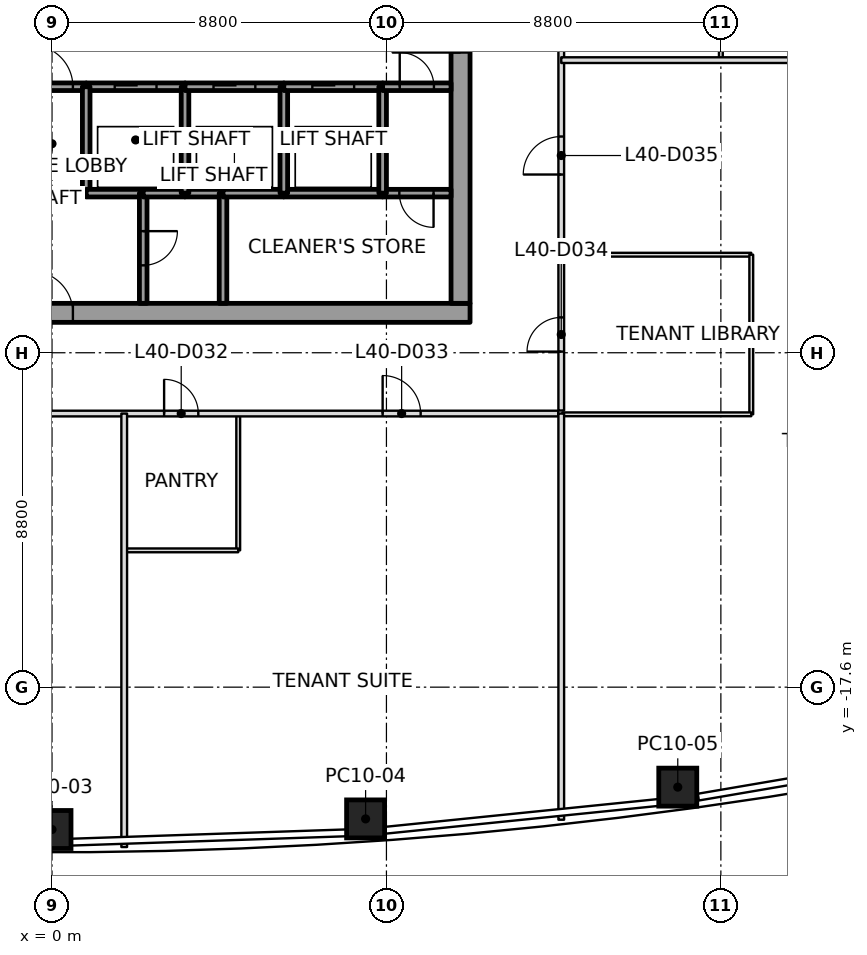
"""IFC4 building model, lengths in metres.
Left out: names, types, materials, properties, quantities, classifications, styles, units other than length and angle.
Written with IfcOpenShell. Run it as: python <this file> out.ifc"""

import sys

from ifc_helpers import new_model, si_unit, direction, frame, frame_2d, origin, origin_2d, place, context, subcontext, project, spatial, rectangle, extrude, element, fill, save


model = new_model("IFC4")
c1 = context("Model", 3, precision=1e-05, world=origin(), true_north=direction((0.0, 1.0)))
c2 = subcontext(c1, "Body", "Model", "MODEL_VIEW")
j1 = project(units=[si_unit("LENGTHUNIT", "METRE"), si_unit("PLANEANGLEUNIT", "RADIAN")], contexts=[c1])
p1 = place(None, origin())
s1 = spatial("IfcSite", under=j1, at=p1, CompositionType="ELEMENT")
p2 = place(p1, origin())
s2 = spatial("IfcBuilding", under=s1, at=p2, CompositionType="ELEMENT")
p3 = place(p2, frame((0.0, 0.0, 181.8)))
s3 = spatial("IfcBuildingStorey", under=s2, at=p3, CompositionType="ELEMENT", Elevation=181.8)
p4 = place(p3, frame((0.0, -21.346, 0.0), z_axis=(0.0, 0.01141283087, 0.999934871525), x_axis=(1.0, 0.0, 0.0)))
e1 = element("IfcColumn", 1, at=p4, inside=s3, PredefinedType="COLUMN", context=c2, shape_type="SweptSolid", body=[
    extrude(rectangle(XDim=1.0, YDim=1.0, at=origin_2d()), origin(), (0.0, 0.0, 1.0), 4.0),
])
p5 = place(p3, frame((8.252, -21.067, 0.0), z_axis=(-0.008788174922, 0.01116830563, 0.999899013366), x_axis=(0.997677690946, 0.0676388512, 0.008013163924)))
e2 = element("IfcColumn", 2, at=p5, inside=s3, PredefinedType="COLUMN", context=c2, shape_type="SweptSolid", body=[
    extrude(rectangle(XDim=1.0, YDim=1.0, at=origin_2d()), origin(), (0.0, 0.0, 1.0), 4.0),
])
p6 = place(p3, frame((16.466, -20.231, 0.0), z_axis=(-0.017574453011, 0.010434831475, 0.999791104628), x_axis=(0.990722511159, 0.134954425998, 0.016006523216)))
e3 = element("IfcColumn", 3, at=p6, inside=s3, PredefinedType="COLUMN", context=c2, shape_type="SweptSolid", body=[
    extrude(rectangle(XDim=1.0, YDim=1.0, at=origin_2d()), origin(), (0.0, 0.0, 1.0), 4.001),
])
p7 = place(p3, frame((-11.0, -7.75, 0.0), z_axis=(0.0, 0.0, 1.0), x_axis=(1.0, 0.0, 0.0)))
e4 = element("IfcWall", 4, at=p7, inside=s3, PredefinedType="SHEAR", context=c2, shape_type="SweptSolid", body=[
    extrude(rectangle(XDim=22.0, YDim=0.5, at=frame_2d((11.0, 0.0))), origin(), (0.0, 0.0, 1.0), 4.0),
])
p8 = place(p7, frame((10.45, 0.0, 0.0)))
e5 = element("IfcOpeningElement", 5, at=p8, cuts=e4, PredefinedType="OPENING", context=c2, shape_type="SweptSolid", body=[
    extrude(rectangle(XDim=1.1, YDim=2.1, at=frame_2d((0.55, 1.05))), frame((0.0, 0.25, 0.0), z_axis=(0.0, -1.0, 0.0), x_axis=(1.0, 0.0, 0.0)), (0.0, 0.0, 1.0), 0.5),
])
p9 = place(p3, frame((10.75, -7.5, 0.0), z_axis=(0.0, 0.0, 1.0), x_axis=(0.0, 1.0, 0.0)))
e6 = element("IfcWall", 6, at=p9, inside=s3, PredefinedType="SHEAR", context=c2, shape_type="SweptSolid", body=[
    extrude(rectangle(XDim=15.0, YDim=0.5, at=frame_2d((7.5, 0.0))), origin(), (0.0, 0.0, 1.0), 4.0),
])
p10 = place(p9, frame((6.6, 0.0, 0.0)))
e7 = element("IfcOpeningElement", 7, at=p10, cuts=e6, PredefinedType="OPENING", context=c2, shape_type="SweptSolid", body=[
    extrude(rectangle(XDim=1.8, YDim=2.1, at=frame_2d((0.9, 1.05))), frame((0.0, 0.25, 0.0), z_axis=(0.0, -1.0, 0.0), x_axis=(1.0, 0.0, 0.0)), (0.0, 0.0, 1.0), 0.5),
])
p11 = place(p3, frame((-0.9, -1.8, 0.0), z_axis=(0.0, 0.0, 1.0), x_axis=(1.0, 0.0, 0.0)))
e8 = element("IfcWall", 8, at=p11, inside=s3, PredefinedType="SOLIDWALL", context=c2, shape_type="SweptSolid", body=[
    extrude(rectangle(XDim=1.8, YDim=0.2, at=frame_2d((0.9, 0.0))), origin(), (0.0, 0.0, 1.0), 3.85),
])
p12 = place(p11, frame((0.35, 0.0, 0.0)))
e9 = element("IfcOpeningElement", 9, at=p12, cuts=e8, PredefinedType="OPENING", context=c2, shape_type="SweptSolid", body=[
    extrude(rectangle(XDim=1.1, YDim=2.1, at=frame_2d((0.55, 1.05))), frame((0.0, 0.1, 0.0), z_axis=(0.0, -1.0, 0.0), x_axis=(1.0, 0.0, 0.0)), (0.0, 0.0, 1.0), 0.2),
])
p13 = place(p3, frame((0.9, -1.8, 0.0), z_axis=(0.0, 0.0, 1.0), x_axis=(1.0, 0.0, 0.0)))
e10 = element("IfcWall", 10, at=p13, inside=s3, PredefinedType="SOLIDWALL", context=c2, shape_type="SweptSolid", body=[
    extrude(rectangle(XDim=2.6, YDim=0.2, at=frame_2d((1.3, 0.0))), origin(), (0.0, 0.0, 1.0), 3.85),
])
p14 = place(p13, frame((0.75, 0.0, 0.0)))
e11 = element("IfcOpeningElement", 11, at=p14, cuts=e10, PredefinedType="OPENING", context=c2, shape_type="SweptSolid", body=[
    extrude(rectangle(XDim=1.1, YDim=2.1, at=frame_2d((0.55, 1.05))), frame((0.0, 0.1, 0.0), z_axis=(0.0, -1.0, 0.0), x_axis=(1.0, 0.0, 0.0)), (0.0, 0.0, 1.0), 0.2),
])
p15 = place(p3, frame((0.9, -1.8, 0.0), z_axis=(0.0, 0.0, 1.0), x_axis=(0.0, -1.0, 0.0)))
e12 = element("IfcWall", 12, at=p15, inside=s3, PredefinedType="SOLIDWALL", context=c2, shape_type="SweptSolid", body=[
    extrude(rectangle(XDim=2.8, YDim=0.2, at=frame_2d((1.4, 0.0))), origin(), (0.0, 0.0, 1.0), 3.85),
])
p16 = place(p3, frame((0.9, -4.6, 0.0), z_axis=(0.0, 0.0, 1.0), x_axis=(1.0, 0.0, 0.0)))
e13 = element("IfcWall", 13, at=p16, inside=s3, PredefinedType="SOLIDWALL", context=c2, shape_type="SweptSolid", body=[
    extrude(rectangle(XDim=1.5, YDim=0.2, at=frame_2d((0.75, 0.0))), origin(), (0.0, 0.0, 1.0), 3.85),
])
p17 = place(p3, frame((2.4, -4.6, 0.0), z_axis=(0.0, 0.0, 1.0), x_axis=(0.0, -1.0, 0.0)))
e14 = element("IfcWall", 14, at=p17, inside=s3, PredefinedType="SOLIDWALL", context=c2, shape_type="SweptSolid", body=[
    extrude(rectangle(XDim=2.9, YDim=0.2, at=frame_2d((1.45, 0.0))), origin(), (0.0, 0.0, 1.0), 3.85),
])
p18 = place(p17, frame((1.0, 0.0, 0.0)))
e15 = element("IfcOpeningElement", 15, at=p18, cuts=e14, PredefinedType="OPENING", context=c2, shape_type="SweptSolid", body=[
    extrude(rectangle(XDim=0.9, YDim=2.1, at=frame_2d((0.45, 1.05))), frame((0.0, 0.1, 0.0), z_axis=(0.0, -1.0, 0.0), x_axis=(1.0, 0.0, 0.0)), (0.0, 0.0, 1.0), 0.2),
])
p19 = place(p3, frame((3.5, -4.6, 0.0), z_axis=(0.0, 0.0, 1.0), x_axis=(-1.0, 0.0, 0.0)))
e16 = element("IfcWall", 16, at=p19, inside=s3, PredefinedType="SOLIDWALL", context=c2, shape_type="SweptSolid", body=[
    extrude(rectangle(XDim=1.1, YDim=0.2, at=frame_2d((0.55, 0.0))), origin(), (0.0, 0.0, 1.0), 3.85),
])
p20 = place(p3, frame((4.5, -4.6, 0.0), z_axis=(0.0, 0.0, 1.0), x_axis=(-1.0, 0.0, 0.0)))
e17 = element("IfcWall", 17, at=p20, inside=s3, PredefinedType="SOLIDWALL", context=c2, shape_type="SweptSolid", body=[
    extrude(rectangle(XDim=1.0, YDim=0.2, at=frame_2d((0.5, 0.0))), origin(), (0.0, 0.0, 1.0), 3.85),
])
p21 = place(p3, frame((3.5, -4.6, 0.0), z_axis=(0.0, 0.0, 1.0), x_axis=(0.0, 1.0, 0.0)))
e18 = element("IfcWall", 18, at=p21, inside=s3, PredefinedType="SOLIDWALL", context=c2, shape_type="SweptSolid", body=[
    extrude(rectangle(XDim=2.8, YDim=0.2, at=frame_2d((1.4, 0.0))), origin(), (0.0, 0.0, 1.0), 3.85),
])
p22 = place(p3, frame((3.5, -1.8, 0.0), z_axis=(0.0, 0.0, 1.0), x_axis=(1.0, 0.0, 0.0)))
e19 = element("IfcWall", 19, at=p22, inside=s3, PredefinedType="SOLIDWALL", context=c2, shape_type="SweptSolid", body=[
    extrude(rectangle(XDim=2.6, YDim=0.2, at=frame_2d((1.3, 0.0))), origin(), (0.0, 0.0, 1.0), 3.85),
])
p23 = place(p22, frame((0.75, 0.0, 0.0)))
e20 = element("IfcOpeningElement", 20, at=p23, cuts=e19, PredefinedType="OPENING", context=c2, shape_type="SweptSolid", body=[
    extrude(rectangle(XDim=1.1, YDim=2.1, at=frame_2d((0.55, 1.05))), frame((0.0, 0.1, 0.0), z_axis=(0.0, -1.0, 0.0), x_axis=(1.0, 0.0, 0.0)), (0.0, 0.0, 1.0), 0.2),
])
p24 = place(p3, frame((4.5, -4.6, 0.0), z_axis=(0.0, 0.0, 1.0), x_axis=(0.0, -1.0, 0.0)))
e21 = element("IfcWall", 21, at=p24, inside=s3, PredefinedType="SOLIDWALL", context=c2, shape_type="SweptSolid", body=[
    extrude(rectangle(XDim=2.9, YDim=0.2, at=frame_2d((1.45, 0.0))), origin(), (0.0, 0.0, 1.0), 3.85),
])
p25 = place(p3, frame((6.1, -4.6, 0.0), z_axis=(0.0, 0.0, 1.0), x_axis=(-1.0, 0.0, 0.0)))
e22 = element("IfcWall", 22, at=p25, inside=s3, PredefinedType="SOLIDWALL", context=c2, shape_type="SweptSolid", body=[
    extrude(rectangle(XDim=1.6, YDim=0.2, at=frame_2d((0.8, 0.0))), origin(), (0.0, 0.0, 1.0), 3.85),
])
p26 = place(p3, frame((8.7, -4.6, 0.0), z_axis=(0.0, 0.0, 1.0), x_axis=(-1.0, 0.0, 0.0)))
e23 = element("IfcWall", 23, at=p26, inside=s3, PredefinedType="SOLIDWALL", context=c2, shape_type="SweptSolid", body=[
    extrude(rectangle(XDim=2.6, YDim=0.2, at=frame_2d((1.3, 0.0))), origin(), (0.0, 0.0, 1.0), 3.85),
])
p27 = place(p3, frame((6.1, -4.6, 0.0), z_axis=(0.0, 0.0, 1.0), x_axis=(0.0, 1.0, 0.0)))
e24 = element("IfcWall", 24, at=p27, inside=s3, PredefinedType="SOLIDWALL", context=c2, shape_type="SweptSolid", body=[
    extrude(rectangle(XDim=2.8, YDim=0.2, at=frame_2d((1.4, 0.0))), origin(), (0.0, 0.0, 1.0), 3.85),
])
p28 = place(p3, frame((6.1, -1.8, 0.0), z_axis=(0.0, 0.0, 1.0), x_axis=(1.0, 0.0, 0.0)))
e25 = element("IfcWall", 25, at=p28, inside=s3, PredefinedType="SOLIDWALL", context=c2, shape_type="SweptSolid", body=[
    extrude(rectangle(XDim=2.6, YDim=0.2, at=frame_2d((1.3, 0.0))), origin(), (0.0, 0.0, 1.0), 3.85),
])
p29 = place(p28, frame((0.75, 0.0, 0.0)))
e26 = element("IfcOpeningElement", 26, at=p29, cuts=e25, PredefinedType="OPENING", context=c2, shape_type="SweptSolid", body=[
    extrude(rectangle(XDim=1.1, YDim=2.1, at=frame_2d((0.55, 1.05))), frame((0.0, 0.1, 0.0), z_axis=(0.0, -1.0, 0.0), x_axis=(1.0, 0.0, 0.0)), (0.0, 0.0, 1.0), 0.2),
])
p30 = place(p3, frame((10.5, -4.6, 0.0), z_axis=(0.0, 0.0, 1.0), x_axis=(-1.0, 0.0, 0.0)))
e27 = element("IfcWall", 27, at=p30, inside=s3, PredefinedType="SOLIDWALL", context=c2, shape_type="SweptSolid", body=[
    extrude(rectangle(XDim=1.8, YDim=0.2, at=frame_2d((0.9, 0.0))), origin(), (0.0, 0.0, 1.0), 3.85),
])
p31 = place(p30, frame((0.46, 0.0, 0.0)))
e28 = element("IfcOpeningElement", 28, at=p31, cuts=e27, PredefinedType="OPENING", context=c2, shape_type="SweptSolid", body=[
    extrude(rectangle(XDim=0.9, YDim=2.1, at=frame_2d((0.45, 1.05))), frame((0.0, 0.1, 0.0), z_axis=(0.0, -1.0, 0.0), x_axis=(1.0, 0.0, 0.0)), (0.0, 0.0, 1.0), 0.2),
])
p32 = place(p3, frame((8.7, -1.8, 0.0), z_axis=(0.0, 0.0, 1.0), x_axis=(0.0, -1.0, 0.0)))
e29 = element("IfcWall", 29, at=p32, inside=s3, PredefinedType="SOLIDWALL", context=c2, shape_type="SweptSolid", body=[
    extrude(rectangle(XDim=2.8, YDim=0.2, at=frame_2d((1.4, 0.0))), origin(), (0.0, 0.0, 1.0), 3.85),
])
p33 = place(p3, frame((8.7, -1.8, 0.0), z_axis=(0.0, 0.0, 1.0), x_axis=(1.0, 0.0, 0.0)))
e30 = element("IfcWall", 30, at=p33, inside=s3, PredefinedType="SOLIDWALL", context=c2, shape_type="SweptSolid", body=[
    extrude(rectangle(XDim=1.8, YDim=0.2, at=frame_2d((0.9, 0.0))), origin(), (0.0, 0.0, 1.0), 3.85),
])
p34 = place(p33, frame((0.45, 0.0, 0.0)))
e31 = element("IfcOpeningElement", 31, at=p34, cuts=e30, PredefinedType="OPENING", context=c2, shape_type="SweptSolid", body=[
    extrude(rectangle(XDim=0.9, YDim=2.1, at=frame_2d((0.45, 1.05))), frame((0.0, 0.1, 0.0), z_axis=(0.0, -1.0, 0.0), x_axis=(1.0, 0.0, 0.0)), (0.0, 0.0, 1.0), 0.2),
])
p35 = place(p3, frame((1.9, -10.4, 0.0), z_axis=(0.0, 0.0, 1.0), x_axis=(0.0, -1.0, 0.0)))
e32 = element("IfcWall", 32, at=p35, inside=s3, PredefinedType="PARTITIONING", context=c2, shape_type="SweptSolid", body=[
    extrude(rectangle(XDim=11.407, YDim=0.15, at=frame_2d((5.704, 0.0))), origin(), (0.0, 0.0, 1.0), 3.234),
])
p36 = place(p3, frame((13.4, -10.4, 0.0), z_axis=(0.0, 0.0, 1.0), x_axis=(0.0, -1.0, 0.0)))
e33 = element("IfcWall", 33, at=p36, inside=s3, PredefinedType="PARTITIONING", context=c2, shape_type="SweptSolid", body=[
    extrude(rectangle(XDim=10.688, YDim=0.15, at=frame_2d((5.344, 0.0))), origin(), (0.0, 0.0, 1.0), 3.234),
])
p37 = place(p3, frame((24.98, -1.1, 0.0), z_axis=(0.0, 0.0, 1.0), x_axis=(-1.0, 0.0, 0.0)))
e34 = element("IfcWall", 34, at=p37, inside=s3, PredefinedType="PARTITIONING", context=c2, shape_type="SweptSolid", body=[
    extrude(rectangle(XDim=11.58, YDim=0.15, at=frame_2d((5.79, 0.0))), origin(), (0.0, 0.0, 1.0), 3.234),
])
p38 = place(p3, frame((-13.32, -10.4, 0.0), z_axis=(0.0, 0.0, 1.0), x_axis=(1.0, 0.0, 0.0)))
e35 = element("IfcWall", 35, at=p38, inside=s3, PredefinedType="PARTITIONING", context=c2, shape_type="SweptSolid", body=[
    extrude(rectangle(XDim=26.64, YDim=0.15, at=frame_2d((13.32, 0.0))), origin(), (0.0, 0.0, 1.0), 3.317),
])
p39 = place(p38, frame((0.97, 0.0, 0.0)))
e36 = element("IfcOpeningElement", 36, at=p39, cuts=e35, PredefinedType="OPENING", context=c2, shape_type="SweptSolid", body=[
    extrude(rectangle(XDim=0.9, YDim=2.1, at=frame_2d((0.45, 1.05))), frame((0.0, 0.075, 0.0), z_axis=(0.0, -1.0, 0.0), x_axis=(1.0, 0.0, 0.0)), (0.0, 0.0, 1.0), 0.15),
])
p40 = place(p38, frame((8.62, 0.0, 0.0)))
e37 = element("IfcOpeningElement", 37, at=p40, cuts=e35, PredefinedType="OPENING", context=c2, shape_type="SweptSolid", body=[
    extrude(rectangle(XDim=1.0, YDim=2.1, at=frame_2d((0.5, 1.05))), frame((0.0, 0.075, 0.0), z_axis=(0.0, -1.0, 0.0), x_axis=(1.0, 0.0, 0.0)), (0.0, 0.0, 1.0), 0.15),
])
p41 = place(p38, frame((16.27, 0.0, 0.0)))
e38 = element("IfcOpeningElement", 38, at=p41, cuts=e35, PredefinedType="OPENING", context=c2, shape_type="SweptSolid", body=[
    extrude(rectangle(XDim=0.9, YDim=2.1, at=frame_2d((0.45, 1.05))), frame((0.0, 0.075, 0.0), z_axis=(0.0, -1.0, 0.0), x_axis=(1.0, 0.0, 0.0)), (0.0, 0.0, 1.0), 0.15),
])
p42 = place(p38, frame((22.02, 0.0, 0.0)))
e39 = element("IfcOpeningElement", 39, at=p42, cuts=e35, PredefinedType="OPENING", context=c2, shape_type="SweptSolid", body=[
    extrude(rectangle(XDim=1.0, YDim=2.1, at=frame_2d((0.5, 1.05))), frame((0.0, 0.075, 0.0), z_axis=(0.0, -1.0, 0.0), x_axis=(1.0, 0.0, 0.0)), (0.0, 0.0, 1.0), 0.15),
])
p43 = place(p3, frame((13.4, -10.32, 0.0), z_axis=(0.0, 0.0, 1.0), x_axis=(0.0, 1.0, 0.0)))
e40 = element("IfcWall", 40, at=p43, inside=s3, PredefinedType="PARTITIONING", context=c2, shape_type="SweptSolid", body=[
    extrude(rectangle(XDim=20.64, YDim=0.15, at=frame_2d((10.32, 0.0))), origin(), (0.0, 0.0, 1.0), 3.166),
])
p44 = place(p43, frame((10.57, 0.0, 0.0)))
e41 = element("IfcOpeningElement", 41, at=p44, cuts=e40, PredefinedType="OPENING", context=c2, shape_type="SweptSolid", body=[
    extrude(rectangle(XDim=0.9, YDim=2.1, at=frame_2d((0.45, 1.05))), frame((0.0, 0.075, 0.0), z_axis=(0.0, -1.0, 0.0), x_axis=(1.0, 0.0, 0.0)), (0.0, 0.0, 1.0), 0.15),
])
p45 = place(p43, frame((16.32, 0.0, 0.0)))
e42 = element("IfcOpeningElement", 42, at=p45, cuts=e40, PredefinedType="OPENING", context=c2, shape_type="SweptSolid", body=[
    extrude(rectangle(XDim=1.0, YDim=2.1, at=frame_2d((0.5, 1.05))), frame((0.0, 0.075, 0.0), z_axis=(0.0, -1.0, 0.0), x_axis=(1.0, 0.0, 0.0)), (0.0, 0.0, 1.0), 0.15),
])
p46 = place(p43, frame((1.55, 0.0, 0.0)))
e43 = element("IfcOpeningElement", 43, at=p46, cuts=e40, PredefinedType="OPENING", context=c2, shape_type="SweptSolid", body=[
    extrude(rectangle(XDim=0.9, YDim=2.1, at=frame_2d((0.45, 1.05))), frame((0.0, 0.075, 0.0), z_axis=(0.0, -1.0, 0.0), x_axis=(1.0, 0.0, 0.0)), (0.0, 0.0, 1.0), 0.15),
])
p47 = place(p43, frame((6.21, 0.0, 0.0)))
e44 = element("IfcOpeningElement", 44, at=p47, cuts=e40, PredefinedType="OPENING", context=c2, shape_type="SweptSolid", body=[
    extrude(rectangle(XDim=1.0, YDim=2.1, at=frame_2d((0.5, 1.05))), frame((0.0, 0.075, 0.0), z_axis=(0.0, -1.0, 0.0), x_axis=(1.0, 0.0, 0.0)), (0.0, 0.0, 1.0), 0.15),
])
p48 = place(p3, frame((4.9, -10.43, 0.0), z_axis=(0.0, 0.0, 1.0), x_axis=(0.0, -1.0, 0.0)))
e45 = element("IfcWall", 45, at=p48, inside=s3, PredefinedType="PARTITIONING", context=c2, shape_type="SweptSolid", body=[
    extrude(rectangle(XDim=3.57, YDim=0.1, at=frame_2d((1.785, 0.0))), origin(), (0.0, 0.0, 1.0), 3.45),
])
p49 = place(p3, frame((4.9, -14.0, 0.0), z_axis=(0.0, 0.0, 1.0), x_axis=(-1.0, 0.0, 0.0)))
e46 = element("IfcWall", 46, at=p49, inside=s3, PredefinedType="PARTITIONING", context=c2, shape_type="SweptSolid", body=[
    extrude(rectangle(XDim=2.97, YDim=0.1, at=frame_2d((1.485, 0.0))), origin(), (0.0, 0.0, 1.0), 3.317),
])
p50 = place(p3, frame((13.43, -6.22, 0.0), z_axis=(0.0, 0.0, 1.0), x_axis=(1.0, 0.0, 0.0)))
e47 = element("IfcWall", 47, at=p50, inside=s3, PredefinedType="PARTITIONING", context=c2, shape_type="SweptSolid", body=[
    extrude(rectangle(XDim=4.97, YDim=0.1, at=frame_2d((2.485, 0.0))), origin(), (0.0, 0.0, 1.0), 3.247),
])
p51 = place(p3, frame((18.4, -6.22, 0.0), z_axis=(0.0, 0.0, 1.0), x_axis=(0.0, -1.0, 0.0)))
e48 = element("IfcWall", 48, at=p51, inside=s3, PredefinedType="PARTITIONING", context=c2, shape_type="SweptSolid", body=[
    extrude(rectangle(XDim=4.2, YDim=0.1, at=frame_2d((2.1, 0.0))), origin(), (0.0, 0.0, 1.0), 3.45),
])
p52 = place(p3, frame((18.4, -10.42, 0.0), z_axis=(0.0, 0.0, 1.0), x_axis=(-1.0, 0.0, 0.0)))
e49 = element("IfcWall", 49, at=p52, inside=s3, PredefinedType="PARTITIONING", context=c2, shape_type="SweptSolid", body=[
    extrude(rectangle(XDim=4.97, YDim=0.1, at=frame_2d((2.485, 0.0))), origin(), (0.0, 0.0, 1.0), 3.166),
])
p53 = place(p3, frame((17.6, 2.5, 0.0), z_axis=(0.0, 0.0, 1.0), x_axis=(0.0, -1.0, 0.0)))
e50 = element("IfcWall", 50, at=p53, inside=s3, PredefinedType="PARTITIONING", context=c2, shape_type="SweptSolid", body=[
    extrude(rectangle(XDim=3.57, YDim=0.1, at=frame_2d((1.785, 0.0))), origin(), (0.0, 0.0, 1.0), 3.317),
])
p54 = place(p41, origin())
e51 = element("IfcDoor", 51, at=p54, inside=s3, OperationType="SINGLE_SWING_RIGHT", PredefinedType="DOOR", context=c2, shape_type="SweptSolid", body=[
    extrude(rectangle(XDim=0.9, YDim=2.1, at=frame_2d((0.45, 1.05))), frame((0.0, 0.025, 0.0), z_axis=(0.0, -1.0, 0.0), x_axis=(1.0, 0.0, 0.0)), (0.0, 0.0, 1.0), 0.05),
])
fill(e38, e51)
p55 = place(p42, origin())
e52 = element("IfcDoor", 52, at=p55, inside=s3, OperationType="SINGLE_SWING_RIGHT", PredefinedType="DOOR", context=c2, shape_type="SweptSolid", body=[
    extrude(rectangle(XDim=1.0, YDim=2.1, at=frame_2d((0.5, 1.05))), frame((0.0, 0.025, 0.0), z_axis=(0.0, -1.0, 0.0), x_axis=(1.0, 0.0, 0.0)), (0.0, 0.0, 1.0), 0.05),
])
fill(e39, e52)
p56 = place(p46, origin())
e53 = element("IfcDoor", 53, at=p56, inside=s3, OperationType="SINGLE_SWING_LEFT", PredefinedType="DOOR", context=c2, shape_type="SweptSolid", body=[
    extrude(rectangle(XDim=0.9, YDim=2.1, at=frame_2d((0.45, 1.05))), frame((0.0, 0.025, 0.0), z_axis=(0.0, -1.0, 0.0), x_axis=(1.0, 0.0, 0.0)), (0.0, 0.0, 1.0), 0.05),
])
fill(e43, e53)
p57 = place(p47, origin())
e54 = element("IfcDoor", 54, at=p57, inside=s3, OperationType="SINGLE_SWING_RIGHT", PredefinedType="DOOR", context=c2, shape_type="SweptSolid", body=[
    extrude(rectangle(XDim=1.0, YDim=2.1, at=frame_2d((0.5, 1.05))), frame((0.0, 0.025, 0.0), z_axis=(0.0, -1.0, 0.0), x_axis=(1.0, 0.0, 0.0)), (0.0, 0.0, 1.0), 0.05),
])
fill(e44, e54)
p58 = place(p14, origin())
e55 = element("IfcDoor", 55, at=p58, inside=s3, OperationType="SLIDING_TO_LEFT", PredefinedType="DOOR", context=c2, shape_type="SweptSolid", body=[
    extrude(rectangle(XDim=1.1, YDim=2.1, at=frame_2d((0.55, 1.05))), frame((0.0, 0.025, 0.0), z_axis=(0.0, -1.0, 0.0), x_axis=(1.0, 0.0, 0.0)), (0.0, 0.0, 1.0), 0.05),
])
fill(e11, e55)
p59 = place(p23, origin())
e56 = element("IfcDoor", 56, at=p59, inside=s3, OperationType="SLIDING_TO_LEFT", PredefinedType="DOOR", context=c2, shape_type="SweptSolid", body=[
    extrude(rectangle(XDim=1.1, YDim=2.1, at=frame_2d((0.55, 1.05))), frame((0.0, 0.025, 0.0), z_axis=(0.0, -1.0, 0.0), x_axis=(1.0, 0.0, 0.0)), (0.0, 0.0, 1.0), 0.05),
])
fill(e20, e56)
p60 = place(p29, origin())
e57 = element("IfcDoor", 57, at=p60, inside=s3, OperationType="SLIDING_TO_LEFT", PredefinedType="DOOR", context=c2, shape_type="SweptSolid", body=[
    extrude(rectangle(XDim=1.1, YDim=2.1, at=frame_2d((0.55, 1.05))), frame((0.0, 0.025, 0.0), z_axis=(0.0, -1.0, 0.0), x_axis=(1.0, 0.0, 0.0)), (0.0, 0.0, 1.0), 0.05),
])
fill(e26, e57)
p61 = place(p12, origin())
e58 = element("IfcDoor", 58, at=p61, inside=s3, OperationType="SINGLE_SWING_LEFT", PredefinedType="DOOR", context=c2, shape_type="SweptSolid", body=[
    extrude(rectangle(XDim=1.1, YDim=2.1, at=frame_2d((0.55, 1.05))), frame((0.0, 0.025, 0.0), z_axis=(0.0, -1.0, 0.0), x_axis=(1.0, 0.0, 0.0)), (0.0, 0.0, 1.0), 0.05),
])
fill(e9, e58)
p62 = place(p31, origin())
e59 = element("IfcDoor", 59, at=p62, inside=s3, OperationType="SINGLE_SWING_LEFT", PredefinedType="DOOR", context=c2, shape_type="SweptSolid", body=[
    extrude(rectangle(XDim=0.9, YDim=2.1, at=frame_2d((0.45, 1.05))), frame((0.0, 0.025, 0.0), z_axis=(0.0, -1.0, 0.0), x_axis=(1.0, 0.0, 0.0)), (0.0, 0.0, 1.0), 0.05),
])
fill(e28, e59)
p63 = place(p34, origin())
e60 = element("IfcDoor", 60, at=p63, inside=s3, OperationType="SINGLE_SWING_LEFT", PredefinedType="DOOR", context=c2, shape_type="SweptSolid", body=[
    extrude(rectangle(XDim=0.9, YDim=2.1, at=frame_2d((0.45, 1.05))), frame((0.0, 0.025, 0.0), z_axis=(0.0, -1.0, 0.0), x_axis=(1.0, 0.0, 0.0)), (0.0, 0.0, 1.0), 0.05),
])
fill(e31, e60)
p64 = place(p18, origin())
e61 = element("IfcDoor", 61, at=p64, inside=s3, OperationType="SINGLE_SWING_LEFT", PredefinedType="DOOR", context=c2, shape_type="SweptSolid", body=[
    extrude(rectangle(XDim=0.9, YDim=2.1, at=frame_2d((0.45, 1.05))), frame((0.0, 0.025, 0.0), z_axis=(0.0, -1.0, 0.0), x_axis=(1.0, 0.0, 0.0)), (0.0, 0.0, 1.0), 0.05),
])
fill(e15, e61)
p65 = place(p10, origin())
e62 = element("IfcDoor", 62, at=p65, inside=s3, OperationType="DOUBLE_DOOR_SINGLE_SWING", PredefinedType="DOOR", context=c2, shape_type="SweptSolid", body=[
    extrude(rectangle(XDim=1.8, YDim=2.1, at=frame_2d((0.9, 1.05))), frame((0.0, 0.025, 0.0), z_axis=(0.0, -1.0, 0.0), x_axis=(1.0, 0.0, 0.0)), (0.0, 0.0, 1.0), 0.05),
])
fill(e7, e62)
p66 = place(p8, origin())
e63 = element("IfcDoor", 63, at=p66, inside=s3, OperationType="SINGLE_SWING_LEFT", PredefinedType="DOOR", context=c2, shape_type="SweptSolid", body=[
    extrude(rectangle(XDim=1.1, YDim=2.1, at=frame_2d((0.55, 1.05))), frame((0.0, 0.025, 0.0), z_axis=(0.0, -1.0, 0.0), x_axis=(1.0, 0.0, 0.0)), (0.0, 0.0, 1.0), 0.05),
])
fill(e5, e63)
save(model, sys.argv[1])
